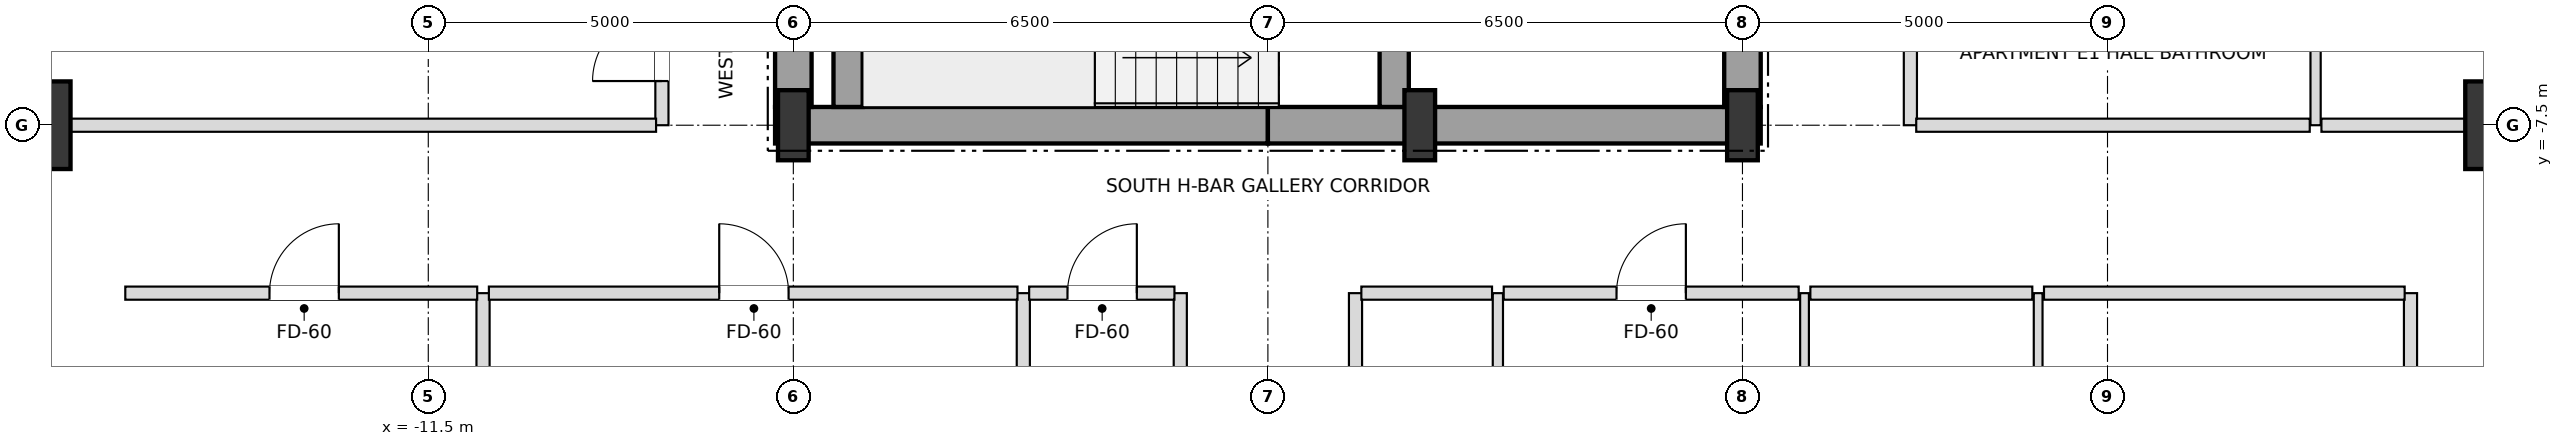
"""IFC4 building model, lengths in metres.
Left out: names, types, materials, properties, quantities, classifications, styles, units other than length and angle.
Written with IfcOpenShell. Run it as: python <this file> out.ifc"""

import sys

from ifc_helpers import new_model, si_unit, direction, frame, frame_2d, origin, origin_2d, place, context, subcontext, project, spatial, rectangle, i_section, extrude, element, fill, save


model = new_model("IFC4")
c1 = context("Model", 3, precision=1e-05, world=origin(), true_north=direction((0.0, 1.0)))
c2 = subcontext(c1, "Body", "Model", "MODEL_VIEW")
j1 = project(units=[si_unit("LENGTHUNIT", "METRE"), si_unit("PLANEANGLEUNIT", "RADIAN")], contexts=[c1])
p1 = place(None, origin())
s1 = spatial("IfcSite", under=j1, at=p1, CompositionType="ELEMENT")
p2 = place(p1, origin())
s2 = spatial("IfcBuilding", under=s1, at=p2, CompositionType="ELEMENT")
p3 = place(p2, frame((0.0, 0.0, 154.8)))
s3 = spatial("IfcBuildingStorey", under=s2, at=p3, CompositionType="ELEMENT", Elevation=154.8)
for number, where, z_axis, x_axis in (
    (1, (-6.5, -7.5, 0.0), (0.0, 0.0, 1.0), (1.0, 0.0, 0.0)),
    (2, (2.08, -7.5, 0.0), (0.0, 0.0, 1.0), (1.0, 0.0, 0.0)),
    (3, (6.5, -7.5, 0.0), (0.0, 0.0, 1.0), (1.0, 0.0, 0.0)),
):
    element("IfcColumn", number, at=place(p3, frame(where, z_axis=z_axis, x_axis=x_axis)), inside=s3, PredefinedType="COLUMN", context=c2, shape_type="SweptSolid", body=[
        extrude(i_section(OverallWidth=0.42, OverallDepth=0.96, WebThickness=0.022, FlangeThickness=0.034, at=origin_2d()), origin(), (0.0, 0.0, 1.0), 3.6),
    ])
for number, where, z_axis, x_axis in (
    (4, (17.0, -7.5, 0.0), (0.0, 0.0, 1.0), (1.0, 0.0, 0.0)),
    (5, (-17.0, -7.5, 0.0), (0.0, 0.0, 1.0), (1.0, 0.0, 0.0)),
):
    element("IfcColumn", number, at=place(p3, frame(where, z_axis=z_axis, x_axis=x_axis)), inside=s3, PredefinedType="USERDEFINED", context=c2, shape_type="SweptSolid", body=[
        extrude(rectangle(XDim=1.2, YDim=1.2, at=origin_2d()), origin(), (0.0, 0.0, 1.0), 3.6),
    ])
for number, where, z_axis, x_axis in (
    (6, (-6.75, -7.5, 0.0), (0.0, 0.0, 1.0), (1.0, 0.0, 0.0)),
    (7, (0.0, -7.5, 0.0), (0.0, 0.0, 1.0), (1.0, 0.0, 0.0)),
):
    element("IfcWall", number, at=place(p3, frame(where, z_axis=z_axis, x_axis=x_axis)), inside=s3, PredefinedType="SHEAR", context=c2, shape_type="SweptSolid", body=[
        extrude(rectangle(XDim=6.75, YDim=0.5, at=frame_2d((3.375, 0.0))), origin(), (0.0, 0.0, 1.0), 3.38),
    ])
p4 = place(p3, frame((-6.5, -7.25, 0.0), z_axis=(0.0, 0.0, 1.0), x_axis=(0.0, 1.0, 0.0)))
e8 = element("IfcWall", 8, at=p4, inside=s3, PredefinedType="SHEAR", context=c2, shape_type="SweptSolid", body=[
    extrude(rectangle(XDim=3.55, YDim=0.5, at=frame_2d((1.775, 0.0))), origin(), (0.0, 0.0, 1.0), 3.38),
])
p5 = place(p3, frame((6.5, -7.25, 0.0), z_axis=(0.0, 0.0, 1.0), x_axis=(0.0, 1.0, 0.0)))
e9 = element("IfcWall", 9, at=p5, inside=s3, PredefinedType="SHEAR", context=c2, shape_type="SweptSolid", body=[
    extrude(rectangle(XDim=5.75, YDim=0.5, at=frame_2d((2.875, 0.0))), origin(), (0.0, 0.0, 1.0), 3.38),
])
p6 = place(p5, frame((0.85, 0.0, 0.0)))
e10 = element("IfcOpeningElement", 10, at=p6, cuts=e9, PredefinedType="OPENING", context=c2, shape_type="SweptSolid", body=[
    extrude(rectangle(XDim=1.05, YDim=2.15, at=frame_2d((0.525, 1.075))), frame((0.0, 0.26, 0.0), z_axis=(0.0, -1.0, 0.0), x_axis=(1.0, 0.0, 0.0)), (0.0, 0.0, 1.0), 0.52),
])
p7 = place(p3, frame((-5.75, -7.25, 0.0), z_axis=(0.0, 0.0, 1.0), x_axis=(0.0, 1.0, 0.0)))
e11 = element("IfcWall", 11, at=p7, inside=s3, PredefinedType="SHEAR", context=c2, shape_type="SweptSolid", body=[
    extrude(rectangle(XDim=2.9, YDim=0.4, at=frame_2d((1.45, 0.0))), origin(), (0.0, 0.0, 1.0), 3.38),
])
p8 = place(p3, frame((1.73, -7.25, 0.0), z_axis=(0.0, 0.0, 1.0), x_axis=(0.0, 1.0, 0.0)))
e12 = element("IfcWall", 12, at=p8, inside=s3, PredefinedType="SHEAR", context=c2, shape_type="SweptSolid", body=[
    extrude(rectangle(XDim=3.3, YDim=0.4, at=frame_2d((1.65, 0.0))), origin(), (0.0, 0.0, 1.0), 3.38),
])
p9 = place(p8, frame((0.9, 0.0, 0.0)))
e13 = element("IfcOpeningElement", 13, at=p9, cuts=e12, PredefinedType="OPENING", context=c2, shape_type="SweptSolid", body=[
    extrude(rectangle(XDim=1.05, YDim=2.15, at=frame_2d((0.525, 1.075))), frame((0.0, 0.21, 0.0), z_axis=(0.0, -1.0, 0.0), x_axis=(1.0, 0.0, 0.0)), (0.0, 0.0, 1.0), 0.42),
])
p10 = place(p3, frame((-10.75, -23.15, 0.0), z_axis=(0.0, 0.0, 1.0), x_axis=(0.0, 1.0, 0.0)))
e14 = element("IfcWall", 14, at=p10, inside=s3, PredefinedType="PARTITIONING", context=c2, shape_type="SweptSolid", body=[
    extrude(rectangle(XDim=13.35, YDim=0.18, at=frame_2d((6.675, 0.0))), origin(), (0.0, 0.0, 1.0), 2.816),
])
p11 = place(p3, frame((-8.3, -7.5, 0.0), z_axis=(0.0, 0.0, 1.0), x_axis=(0.0, 1.0, 0.0)))
e15 = element("IfcWall", 15, at=p11, inside=s3, PredefinedType="PARTITIONING", context=c2, shape_type="SweptSolid", body=[
    extrude(rectangle(XDim=15.0, YDim=0.18, at=frame_2d((7.5, 0.0))), origin(), (0.0, 0.0, 1.0), 3.38),
])
p12 = place(p11, frame((0.605, 0.0, 0.0)))
e16 = element("IfcOpeningElement", 16, at=p12, cuts=e15, PredefinedType="OPENING", context=c2, shape_type="SweptSolid", body=[
    extrude(rectangle(XDim=0.95, YDim=2.15, at=frame_2d((0.475, 1.075))), frame((0.0, 0.1, 0.0), z_axis=(0.0, -1.0, 0.0), x_axis=(1.0, 0.0, 0.0)), (0.0, 0.0, 1.0), 0.2),
])
p13 = place(p11, frame((2.605, 0.0, 0.0)))
e17 = element("IfcOpeningElement", 17, at=p13, cuts=e15, PredefinedType="OPENING", context=c2, shape_type="SweptSolid", body=[
    extrude(rectangle(XDim=0.95, YDim=2.15, at=frame_2d((0.475, 1.075))), frame((0.0, 0.1, 0.0), z_axis=(0.0, -1.0, 0.0), x_axis=(1.0, 0.0, 0.0)), (0.0, 0.0, 1.0), 0.2),
])
for number, where, z_axis, x_axis in (
    (18, (-3.35, -23.15, 0.0), (0.0, 0.0, 1.0), (0.0, 1.0, 0.0)),
    (19, (-1.2, -23.15, 0.0), (0.0, 0.0, 1.0), (0.0, 1.0, 0.0)),
    (20, (1.2, -23.15, 0.0), (0.0, 0.0, 1.0), (0.0, 1.0, 0.0)),
):
    element("IfcWall", number, at=place(p3, frame(where, z_axis=z_axis, x_axis=x_axis)), inside=s3, PredefinedType="PARTITIONING", context=c2, shape_type="SweptSolid", body=[
        extrude(rectangle(XDim=13.35, YDim=0.18, at=frame_2d((6.675, 0.0))), origin(), (0.0, 0.0, 1.0), 2.816),
    ])
p14 = place(p3, frame((3.15, -17.15, 0.0), z_axis=(0.0, 0.0, 1.0), x_axis=(0.0, 1.0, 0.0)))
e21 = element("IfcWall", 21, at=p14, inside=s3, PredefinedType="PARTITIONING", context=c2, shape_type="SweptSolid", body=[
    extrude(rectangle(XDim=7.35, YDim=0.14, at=frame_2d((3.675, 0.0))), origin(), (0.0, 0.0, 1.0), 3.38),
])
p15 = place(p14, frame((3.23, 0.0, 0.0)))
e22 = element("IfcOpeningElement", 22, at=p15, cuts=e21, PredefinedType="OPENING", context=c2, shape_type="SweptSolid", body=[
    extrude(rectangle(XDim=0.9, YDim=2.1, at=frame_2d((0.45, 1.05))), frame((0.0, 0.08, 0.0), z_axis=(0.0, -1.0, 0.0), x_axis=(1.0, 0.0, 0.0)), (0.0, 0.0, 1.0), 0.16),
])
p16 = place(p3, frame((7.35, -23.15, 0.0), z_axis=(0.0, 0.0, 1.0), x_axis=(0.0, 1.0, 0.0)))
e23 = element("IfcWall", 23, at=p16, inside=s3, PredefinedType="PARTITIONING", context=c2, shape_type="SweptSolid", body=[
    extrude(rectangle(XDim=13.35, YDim=0.12, at=frame_2d((6.675, 0.0))), origin(), (0.0, 0.0, 1.0), 2.816),
])
p17 = place(p16, frame((9.205, 0.0, 0.0)))
e24 = element("IfcOpeningElement", 24, at=p17, cuts=e23, PredefinedType="OPENING", context=c2, shape_type="SweptSolid", body=[
    extrude(rectangle(XDim=0.95, YDim=2.1, at=frame_2d((0.475, 1.05))), frame((0.0, 0.07, 0.0), z_axis=(0.0, -1.0, 0.0), x_axis=(1.0, 0.0, 0.0)), (0.0, 0.0, 1.0), 0.14),
])
p18 = place(p16, frame((1.399, 0.0, 0.0)))
e25 = element("IfcOpeningElement", 25, at=p18, cuts=e23, PredefinedType="OPENING", context=c2, shape_type="SweptSolid", body=[
    extrude(rectangle(XDim=0.9, YDim=2.1, at=frame_2d((0.45, 1.05))), frame((0.0, 0.07, 0.0), z_axis=(0.0, -1.0, 0.0), x_axis=(1.0, 0.0, 0.0)), (0.0, 0.0, 1.0), 0.14),
])
p19 = place(p3, frame((8.8, -7.5, 0.0), z_axis=(0.0, 0.0, 1.0), x_axis=(0.0, 1.0, 0.0)))
e26 = element("IfcWall", 26, at=p19, inside=s3, PredefinedType="PARTITIONING", context=c2, shape_type="SweptSolid", body=[
    extrude(rectangle(XDim=15.0, YDim=0.18, at=frame_2d((7.5, 0.0))), origin(), (0.0, 0.0, 1.0), 3.38),
])
p20 = place(p19, frame((3.475, 0.0, 0.0)))
e27 = element("IfcOpeningElement", 27, at=p20, cuts=e26, PredefinedType="OPENING", context=c2, shape_type="SweptSolid", body=[
    extrude(rectangle(XDim=0.95, YDim=2.15, at=frame_2d((0.475, 1.075))), frame((0.0, 0.1, 0.0), z_axis=(0.0, -1.0, 0.0), x_axis=(1.0, 0.0, 0.0)), (0.0, 0.0, 1.0), 0.2),
])
p21 = place(p3, frame((10.55, -23.15, 0.0), z_axis=(0.0, 0.0, 1.0), x_axis=(0.0, 1.0, 0.0)))
e28 = element("IfcWall", 28, at=p21, inside=s3, PredefinedType="PARTITIONING", context=c2, shape_type="SweptSolid", body=[
    extrude(rectangle(XDim=13.35, YDim=0.12, at=frame_2d((6.675, 0.0))), origin(), (0.0, 0.0, 1.0), 2.816),
])
p22 = place(p21, frame((8.687, 0.0, 0.0)))
e29 = element("IfcOpeningElement", 29, at=p22, cuts=e28, PredefinedType="OPENING", context=c2, shape_type="SweptSolid", body=[
    extrude(rectangle(XDim=0.95, YDim=2.1, at=frame_2d((0.475, 1.05))), frame((0.0, 0.07, 0.0), z_axis=(0.0, -1.0, 0.0), x_axis=(1.0, 0.0, 0.0)), (0.0, 0.0, 1.0), 0.14),
])
p23 = place(p21, frame((1.399, 0.0, 0.0)))
e30 = element("IfcOpeningElement", 30, at=p23, cuts=e28, PredefinedType="OPENING", context=c2, shape_type="SweptSolid", body=[
    extrude(rectangle(XDim=0.9, YDim=2.1, at=frame_2d((0.45, 1.05))), frame((0.0, 0.07, 0.0), z_axis=(0.0, -1.0, 0.0), x_axis=(1.0, 0.0, 0.0)), (0.0, 0.0, 1.0), 0.14),
])
p24 = place(p3, frame((14.35, -7.5, 0.0), z_axis=(0.0, 0.0, 1.0), x_axis=(0.0, 1.0, 0.0)))
e31 = element("IfcWall", 31, at=p24, inside=s3, PredefinedType="PARTITIONING", context=c2, shape_type="SweptSolid", body=[
    extrude(rectangle(XDim=15.0, YDim=0.14, at=frame_2d((7.5, 0.0))), origin(), (0.0, 0.0, 1.0), 3.38),
])
p25 = place(p24, frame((3.475, 0.0, 0.0)))
e32 = element("IfcOpeningElement", 32, at=p25, cuts=e31, PredefinedType="OPENING", context=c2, shape_type="SweptSolid", body=[
    extrude(rectangle(XDim=0.95, YDim=2.1, at=frame_2d((0.475, 1.05))), frame((0.0, 0.08, 0.0), z_axis=(0.0, -1.0, 0.0), x_axis=(1.0, 0.0, 0.0)), (0.0, 0.0, 1.0), 0.16),
])
p26 = place(p3, frame((15.65, -17.15, 0.0), z_axis=(0.0, 0.0, 1.0), x_axis=(0.0, 1.0, 0.0)))
e33 = element("IfcWall", 33, at=p26, inside=s3, PredefinedType="PARTITIONING", context=c2, shape_type="SweptSolid", body=[
    extrude(rectangle(XDim=7.35, YDim=0.18, at=frame_2d((3.675, 0.0))), origin(), (0.0, 0.0, 1.0), 2.736),
])
p27 = place(p3, frame((-15.65, -9.8, 0.0), z_axis=(0.0, 0.0, 1.0), x_axis=(1.0, 0.0, 0.0)))
e34 = element("IfcWall", 34, at=p27, inside=s3, PredefinedType="PARTITIONING", context=c2, shape_type="SweptSolid", body=[
    extrude(rectangle(XDim=4.82, YDim=0.18, at=frame_2d((2.41, 0.0))), origin(), (0.0, 0.0, 1.0), 3.38),
])
p28 = place(p27, frame((1.975, 0.0, 0.0)))
e35 = element("IfcOpeningElement", 35, at=p28, cuts=e34, PredefinedType="OPENING", context=c2, shape_type="SweptSolid", body=[
    extrude(rectangle(XDim=0.95, YDim=2.15, at=frame_2d((0.475, 1.075))), frame((0.0, 0.1, 0.0), z_axis=(0.0, -1.0, 0.0), x_axis=(1.0, 0.0, 0.0)), (0.0, 0.0, 1.0), 0.2),
])
p29 = place(p3, frame((-10.67, -9.8, 0.0), z_axis=(0.0, 0.0, 1.0), x_axis=(1.0, 0.0, 0.0)))
e36 = element("IfcWall", 36, at=p29, inside=s3, PredefinedType="PARTITIONING", context=c2, shape_type="SweptSolid", body=[
    extrude(rectangle(XDim=7.24, YDim=0.18, at=frame_2d((3.62, 0.0))), origin(), (0.0, 0.0, 1.0), 2.816),
])
p30 = place(p29, frame((3.155, 0.0, 0.0)))
e37 = element("IfcOpeningElement", 37, at=p30, cuts=e36, PredefinedType="OPENING", context=c2, shape_type="SweptSolid", body=[
    extrude(rectangle(XDim=0.95, YDim=2.15, at=frame_2d((0.475, 1.075))), frame((0.0, 0.1, 0.0), z_axis=(0.0, -1.0, 0.0), x_axis=(1.0, 0.0, 0.0)), (0.0, 0.0, 1.0), 0.2),
])
p31 = place(p3, frame((-3.27, -9.8, 0.0), z_axis=(0.0, 0.0, 1.0), x_axis=(1.0, 0.0, 0.0)))
e38 = element("IfcWall", 38, at=p31, inside=s3, PredefinedType="PARTITIONING", context=c2, shape_type="SweptSolid", body=[
    extrude(rectangle(XDim=1.99, YDim=0.18, at=frame_2d((0.995, 0.0))), origin(), (0.0, 0.0, 1.0), 3.38),
])
p32 = place(p31, frame((0.525, 0.0, 0.0)))
e39 = element("IfcOpeningElement", 39, at=p32, cuts=e38, PredefinedType="OPENING", context=c2, shape_type="SweptSolid", body=[
    extrude(rectangle(XDim=0.95, YDim=2.15, at=frame_2d((0.475, 1.075))), frame((0.0, 0.1, 0.0), z_axis=(0.0, -1.0, 0.0), x_axis=(1.0, 0.0, 0.0)), (0.0, 0.0, 1.0), 0.2),
])
p33 = place(p3, frame((1.28, -9.8, 0.0), z_axis=(0.0, 0.0, 1.0), x_axis=(1.0, 0.0, 0.0)))
e40 = element("IfcWall", 40, at=p33, inside=s3, PredefinedType="PARTITIONING", context=c2, shape_type="SweptSolid", body=[
    extrude(rectangle(XDim=1.79, YDim=0.18, at=frame_2d((0.895, 0.0))), origin(), (0.0, 0.0, 1.0), 3.38),
])
p34 = place(p3, frame((3.23, -9.8, 0.0), z_axis=(0.0, 0.0, 1.0), x_axis=(1.0, 0.0, 0.0)))
e41 = element("IfcWall", 41, at=p34, inside=s3, PredefinedType="PARTITIONING", context=c2, shape_type="SweptSolid", body=[
    extrude(rectangle(XDim=4.04, YDim=0.18, at=frame_2d((2.02, 0.0))), origin(), (0.0, 0.0, 1.0), 2.816),
])
p35 = place(p34, frame((1.545, 0.0, 0.0)))
e42 = element("IfcOpeningElement", 42, at=p35, cuts=e41, PredefinedType="OPENING", context=c2, shape_type="SweptSolid", body=[
    extrude(rectangle(XDim=0.95, YDim=2.15, at=frame_2d((0.475, 1.075))), frame((0.0, 0.1, 0.0), z_axis=(0.0, -1.0, 0.0), x_axis=(1.0, 0.0, 0.0)), (0.0, 0.0, 1.0), 0.2),
])
p36 = place(p3, frame((7.43, -9.8, 0.0), z_axis=(0.0, 0.0, 1.0), x_axis=(1.0, 0.0, 0.0)))
e43 = element("IfcWall", 43, at=p36, inside=s3, PredefinedType="PARTITIONING", context=c2, shape_type="SweptSolid", body=[
    extrude(rectangle(XDim=3.04, YDim=0.18, at=frame_2d((1.52, 0.0))), origin(), (0.0, 0.0, 1.0), 3.38),
])
p37 = place(p3, frame((10.63, -9.8, 0.0), z_axis=(0.0, 0.0, 1.0), x_axis=(1.0, 0.0, 0.0)))
e44 = element("IfcWall", 44, at=p37, inside=s3, PredefinedType="PARTITIONING", context=c2, shape_type="SweptSolid", body=[
    extrude(rectangle(XDim=4.94, YDim=0.18, at=frame_2d((2.47, 0.0))), origin(), (0.0, 0.0, 1.0), 3.38),
])
p38 = place(p3, frame((-20.15, -7.5, 0.0), z_axis=(0.0, 0.0, 1.0), x_axis=(1.0, 0.0, 0.0)))
e45 = element("IfcWall", 45, at=p38, inside=s3, PredefinedType="PARTITIONING", context=c2, shape_type="SweptSolid", body=[
    extrude(rectangle(XDim=11.77, YDim=0.18, at=frame_2d((5.885, 0.0))), origin(), (0.0, 0.0, 1.0), 2.816),
])
p39 = place(p3, frame((8.88, -7.5, 0.0), z_axis=(0.0, 0.0, 1.0), x_axis=(1.0, 0.0, 0.0)))
e46 = element("IfcWall", 46, at=p39, inside=s3, PredefinedType="PARTITIONING", context=c2, shape_type="SweptSolid", body=[
    extrude(rectangle(XDim=5.39, YDim=0.18, at=frame_2d((2.695, 0.0))), origin(), (0.0, 0.0, 1.0), 2.816),
])
p40 = place(p3, frame((14.43, -7.5, 0.0), z_axis=(0.0, 0.0, 1.0), x_axis=(1.0, 0.0, 0.0)))
e47 = element("IfcWall", 47, at=p40, inside=s3, PredefinedType="PARTITIONING", context=c2, shape_type="SweptSolid", body=[
    extrude(rectangle(XDim=5.72, YDim=0.18, at=frame_2d((2.86, 0.0))), origin(), (0.0, 0.0, 1.0), 2.816),
])
p41 = place(p28, origin())
e48 = element("IfcDoor", 48, at=p41, inside=s3, OperationType="SINGLE_SWING_RIGHT", PredefinedType="DOOR", context=c2, shape_type="SweptSolid", body=[
    extrude(rectangle(XDim=0.95, YDim=2.15, at=frame_2d((0.475, 1.075))), frame((0.0, 0.025, 0.0), z_axis=(0.0, -1.0, 0.0), x_axis=(1.0, 0.0, 0.0)), (0.0, 0.0, 1.0), 0.05),
])
fill(e35, e48)
p42 = place(p30, origin())
e49 = element("IfcDoor", 49, at=p42, inside=s3, OperationType="SINGLE_SWING_LEFT", PredefinedType="DOOR", context=c2, shape_type="SweptSolid", body=[
    extrude(rectangle(XDim=0.95, YDim=2.15, at=frame_2d((0.475, 1.075))), frame((0.0, 0.025, 0.0), z_axis=(0.0, -1.0, 0.0), x_axis=(1.0, 0.0, 0.0)), (0.0, 0.0, 1.0), 0.05),
])
fill(e37, e49)
p43 = place(p32, origin())
e50 = element("IfcDoor", 50, at=p43, inside=s3, OperationType="SINGLE_SWING_RIGHT", PredefinedType="DOOR", context=c2, shape_type="SweptSolid", body=[
    extrude(rectangle(XDim=0.95, YDim=2.15, at=frame_2d((0.475, 1.075))), frame((0.0, 0.025, 0.0), z_axis=(0.0, -1.0, 0.0), x_axis=(1.0, 0.0, 0.0)), (0.0, 0.0, 1.0), 0.05),
])
fill(e39, e50)
p44 = place(p35, origin())
e51 = element("IfcDoor", 51, at=p44, inside=s3, OperationType="SINGLE_SWING_RIGHT", PredefinedType="DOOR", context=c2, shape_type="SweptSolid", body=[
    extrude(rectangle(XDim=0.95, YDim=2.15, at=frame_2d((0.475, 1.075))), frame((0.0, 0.025, 0.0), z_axis=(0.0, -1.0, 0.0), x_axis=(1.0, 0.0, 0.0)), (0.0, 0.0, 1.0), 0.05),
])
fill(e42, e51)
p45 = place(p12, origin())
e52 = element("IfcDoor", 52, at=p45, inside=s3, OperationType="SINGLE_SWING_LEFT", PredefinedType="DOOR", context=c2, shape_type="SweptSolid", body=[
    extrude(rectangle(XDim=0.95, YDim=2.15, at=frame_2d((0.475, 1.075))), frame((0.0, 0.025, 0.0), z_axis=(0.0, -1.0, 0.0), x_axis=(1.0, 0.0, 0.0)), (0.0, 0.0, 1.0), 0.05),
])
fill(e16, e52)
save(model, sys.argv[1])
